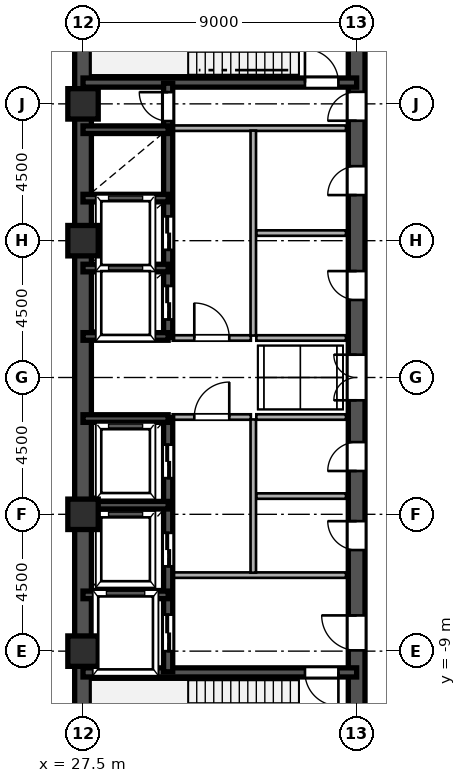
"""IFC4 building model, lengths in metres.
Left out: names, types, materials, properties, quantities, classifications, styles, units other than length and angle.
Written with IfcOpenShell. Run it as: python <this file> out.ifc"""

import sys

from ifc_helpers import new_model, si_unit, direction, frame, frame_2d, origin, origin_2d, place, context, subcontext, project, spatial, rectangle, hollow_rectangle, extrude, source, transform, mapped, element, fill, save


model = new_model("IFC4")
c1 = context("Model", 3, precision=1e-05, world=origin(), true_north=direction((0.0, 1.0)))
c2 = subcontext(c1, "Body", "Model", "MODEL_VIEW")
j1 = project(units=[si_unit("LENGTHUNIT", "METRE"), si_unit("PLANEANGLEUNIT", "RADIAN")], contexts=[c1])
p1 = place(None, origin())
s1 = spatial("IfcSite", under=j1, at=p1, CompositionType="ELEMENT")
p2 = place(p1, origin())
s2 = spatial("IfcBuilding", under=s1, at=p2, CompositionType="ELEMENT")
p3 = place(p2, frame((0.0, 0.0, 135.6)))
s3 = spatial("IfcBuildingStorey", under=s2, at=p3, CompositionType="ELEMENT", Elevation=135.6)
m1 = source(origin(), c2, "Body", "SweptSolid", [
    extrude(hollow_rectangle(XDim=1.0, YDim=1.0, WallThickness=0.042, at=origin_2d()), origin(), (0.0, 0.0, 1.0), 4.8),
])
for number, where, z_axis, x_axis in (
    (1, (27.5, -9.0, 0.0), (0.0, 0.0, 1.0), (1.0, 0.0, 0.0)),
    (2, (27.5, -4.5, 0.0), (0.0, 0.0, 1.0), (1.0, 0.0, 0.0)),
    (3, (27.5, 4.5, 0.0), (0.0, 0.0, 1.0), (1.0, 0.0, 0.0)),
    (4, (27.5, 9.0, 0.0), (0.0, 0.0, 1.0), (1.0, 0.0, 0.0)),
):
    element("IfcColumn", number, at=place(p3, frame(where, z_axis=z_axis, x_axis=x_axis)), inside=s3, PredefinedType="COLUMN", context=c2, shape_type="MappedRepresentation", body=[
        mapped(m1, transform((0.0, 0.0, 0.0), scale=1.0)),
    ])
for number, where, z_axis, x_axis in (
    (5, (27.5, -13.5, 0.0), (0.0, 0.0, 1.0), (0.0, 1.0, 0.0)),
    (6, (27.5, 1.3, 0.0), (0.0, 0.0, 1.0), (0.0, 1.0, 0.0)),
):
    element("IfcWall", number, at=place(p3, frame(where, z_axis=z_axis, x_axis=x_axis)), inside=s3, PredefinedType="SHEAR", context=c2, shape_type="SweptSolid", body=[
        extrude(rectangle(XDim=12.2, YDim=0.55, at=frame_2d((6.1, 0.0))), origin(), (0.0, 0.0, 1.0), 4.58),
    ])
p4 = place(p3, frame((27.5, -1.3, 0.0), z_axis=(0.0, 0.0, 1.0), x_axis=(0.0, 1.0, 0.0)))
e7 = element("IfcWall", 7, at=p4, inside=s3, PredefinedType="SHEAR", context=c2, shape_type="SweptSolid", body=[
    extrude(rectangle(XDim=2.6, YDim=0.55, at=frame_2d((1.3, 0.0))), origin(), (0.0, 0.0, 1.0), 4.58),
])
p5 = place(p3, frame((36.5, -13.65, 0.0), z_axis=(0.0, 0.0, 1.0), x_axis=(0.0, 1.0, 0.0)))
e8 = element("IfcWall", 8, at=p5, inside=s3, PredefinedType="SHEAR", context=c2, shape_type="SweptSolid", body=[
    extrude(rectangle(XDim=7.15, YDim=0.55, at=frame_2d((3.575, 0.0))), origin(), (0.0, 0.0, 1.0), 4.58),
])
p6 = place(p5, frame((4.675, 0.0, 0.0)))
e9 = element("IfcOpeningElement", 9, at=p6, cuts=e8, PredefinedType="OPENING", context=c2, shape_type="SweptSolid", body=[
    extrude(rectangle(XDim=1.15, YDim=2.2, at=frame_2d((0.575, 1.1))), frame((0.0, 0.285, 0.0), z_axis=(0.0, -1.0, 0.0), x_axis=(1.0, 0.0, 0.0)), (0.0, 0.0, 1.0), 0.57),
])
p7 = place(p3, frame((36.5, -1.3, 0.0), z_axis=(0.0, 0.0, 1.0), x_axis=(0.0, 1.0, 0.0)))
e10 = element("IfcWall", 10, at=p7, inside=s3, PredefinedType="SHEAR", context=c2, shape_type="SweptSolid", body=[
    extrude(rectangle(XDim=2.6, YDim=0.55, at=frame_2d((1.3, 0.0))), origin(), (0.0, 0.0, 1.0), 4.58),
])
p8 = place(p7, frame((0.55, 0.0, 0.0)))
e11 = element("IfcOpeningElement", 11, at=p8, cuts=e10, PredefinedType="OPENING", context=c2, shape_type="SweptSolid", body=[
    extrude(rectangle(XDim=1.5, YDim=2.3, at=frame_2d((0.75, 1.15))), frame((0.0, 0.285, 0.0), z_axis=(0.0, -1.0, 0.0), x_axis=(1.0, 0.0, 0.0)), (0.0, 0.0, 1.0), 0.57),
])
p9 = place(p3, frame((36.5, 8.2, 0.0), z_axis=(0.0, 0.0, 1.0), x_axis=(0.0, 1.0, 0.0)))
e12 = element("IfcWall", 12, at=p9, inside=s3, PredefinedType="SHEAR", context=c2, shape_type="SweptSolid", body=[
    extrude(rectangle(XDim=5.45, YDim=0.55, at=frame_2d((2.725, 0.0))), origin(), (0.0, 0.0, 1.0), 4.58),
])
p10 = place(p9, frame((0.245, 0.0, 0.0)))
e13 = element("IfcOpeningElement", 13, at=p10, cuts=e12, PredefinedType="OPENING", context=c2, shape_type="SweptSolid", body=[
    extrude(rectangle(XDim=0.95, YDim=2.15, at=frame_2d((0.475, 1.075))), frame((0.0, 0.285, 0.0), z_axis=(0.0, -1.0, 0.0), x_axis=(1.0, 0.0, 0.0)), (0.0, 0.0, 1.0), 0.57),
])
p11 = place(p3, frame((36.5, -6.5, 0.0), z_axis=(0.0, 0.0, 1.0), x_axis=(0.0, 1.0, 0.0)))
e14 = element("IfcWall", 14, at=p11, inside=s3, PredefinedType="SHEAR", context=c2, shape_type="SweptSolid", body=[
    extrude(rectangle(XDim=2.6, YDim=0.55, at=frame_2d((1.3, 0.0))), origin(), (0.0, 0.0, 1.0), 4.58),
])
p12 = place(p11, frame((0.825, 0.0, 0.0)))
e15 = element("IfcOpeningElement", 15, at=p12, cuts=e14, PredefinedType="OPENING", context=c2, shape_type="SweptSolid", body=[
    extrude(rectangle(XDim=0.95, YDim=2.15, at=frame_2d((0.475, 1.075))), frame((0.0, 0.285, 0.0), z_axis=(0.0, -1.0, 0.0), x_axis=(1.0, 0.0, 0.0)), (0.0, 0.0, 1.0), 0.57),
])
p13 = place(p3, frame((36.5, -3.9, 0.0), z_axis=(0.0, 0.0, 1.0), x_axis=(0.0, 1.0, 0.0)))
e16 = element("IfcWall", 16, at=p13, inside=s3, PredefinedType="SHEAR", context=c2, shape_type="SweptSolid", body=[
    extrude(rectangle(XDim=2.6, YDim=0.55, at=frame_2d((1.3, 0.0))), origin(), (0.0, 0.0, 1.0), 4.58),
])
p14 = place(p13, frame((0.825, 0.0, 0.0)))
e17 = element("IfcOpeningElement", 17, at=p14, cuts=e16, PredefinedType="OPENING", context=c2, shape_type="SweptSolid", body=[
    extrude(rectangle(XDim=0.95, YDim=2.15, at=frame_2d((0.475, 1.075))), frame((0.0, 0.285, 0.0), z_axis=(0.0, -1.0, 0.0), x_axis=(1.0, 0.0, 0.0)), (0.0, 0.0, 1.0), 0.57),
])
p15 = place(p3, frame((36.5, 1.3, 0.0), z_axis=(0.0, 0.0, 1.0), x_axis=(0.0, 1.0, 0.0)))
e18 = element("IfcWall", 18, at=p15, inside=s3, PredefinedType="SHEAR", context=c2, shape_type="SweptSolid", body=[
    extrude(rectangle(XDim=3.45, YDim=0.55, at=frame_2d((1.725, 0.0))), origin(), (0.0, 0.0, 1.0), 4.58),
])
p16 = place(p15, frame((1.25, 0.0, 0.0)))
e19 = element("IfcOpeningElement", 19, at=p16, cuts=e18, PredefinedType="OPENING", context=c2, shape_type="SweptSolid", body=[
    extrude(rectangle(XDim=0.95, YDim=2.15, at=frame_2d((0.475, 1.075))), frame((0.0, 0.285, 0.0), z_axis=(0.0, -1.0, 0.0), x_axis=(1.0, 0.0, 0.0)), (0.0, 0.0, 1.0), 0.57),
])
p17 = place(p3, frame((36.5, 4.75, 0.0), z_axis=(0.0, 0.0, 1.0), x_axis=(0.0, 1.0, 0.0)))
e20 = element("IfcWall", 20, at=p17, inside=s3, PredefinedType="SHEAR", context=c2, shape_type="SweptSolid", body=[
    extrude(rectangle(XDim=3.45, YDim=0.55, at=frame_2d((1.725, 0.0))), origin(), (0.0, 0.0, 1.0), 4.58),
])
p18 = place(p17, frame((1.25, 0.0, 0.0)))
e21 = element("IfcOpeningElement", 21, at=p18, cuts=e20, PredefinedType="OPENING", context=c2, shape_type="SweptSolid", body=[
    extrude(rectangle(XDim=0.95, YDim=2.15, at=frame_2d((0.475, 1.075))), frame((0.0, 0.285, 0.0), z_axis=(0.0, -1.0, 0.0), x_axis=(1.0, 0.0, 0.0)), (0.0, 0.0, 1.0), 0.57),
])
p19 = place(p3, frame((27.5, -9.7, 0.0), z_axis=(0.0, 0.0, 1.0), x_axis=(1.0, 0.0, 0.0)))
e22 = element("IfcWall", 22, at=p19, inside=s3, PredefinedType="SHEAR", context=c2, shape_type="SweptSolid", body=[
    extrude(rectangle(XDim=9.0, YDim=0.3, at=frame_2d((4.5, 0.0))), origin(), (0.0, 0.0, 1.0), 4.58),
])
p20 = place(p19, frame((7.3, 0.0, 0.0)))
e23 = element("IfcOpeningElement", 23, at=p20, cuts=e22, PredefinedType="OPENING", context=c2, shape_type="SweptSolid", body=[
    extrude(rectangle(XDim=1.1, YDim=2.2, at=frame_2d((0.55, 1.1))), frame((0.0, 0.16, 0.0), z_axis=(0.0, -1.0, 0.0), x_axis=(1.0, 0.0, 0.0)), (0.0, 0.0, 1.0), 0.32),
])
p21 = place(p3, frame((27.5, 9.7, 0.0), z_axis=(0.0, 0.0, 1.0), x_axis=(1.0, 0.0, 0.0)))
e24 = element("IfcWall", 24, at=p21, inside=s3, PredefinedType="SHEAR", context=c2, shape_type="SweptSolid", body=[
    extrude(rectangle(XDim=9.0, YDim=0.3, at=frame_2d((4.5, 0.0))), origin(), (0.0, 0.0, 1.0), 4.58),
])
p22 = place(p21, frame((7.3, 0.0, 0.0)))
e25 = element("IfcOpeningElement", 25, at=p22, cuts=e24, PredefinedType="OPENING", context=c2, shape_type="SweptSolid", body=[
    extrude(rectangle(XDim=1.1, YDim=2.2, at=frame_2d((0.55, 1.1))), frame((0.0, 0.16, 0.0), z_axis=(0.0, -1.0, 0.0), x_axis=(1.0, 0.0, 0.0)), (0.0, 0.0, 1.0), 0.32),
])
for number, where, z_axis, x_axis in (
    (26, (27.5, -7.15, 0.0), (0.0, 0.0, 1.0), (1.0, 0.0, 0.0)),
    (27, (27.5, -4.2, 0.0), (0.0, 0.0, 1.0), (1.0, 0.0, 0.0)),
    (28, (27.5, -1.35, 0.0), (0.0, 0.0, 1.0), (1.0, 0.0, 0.0)),
    (29, (27.5, 1.35, 0.0), (0.0, 0.0, 1.0), (1.0, 0.0, 0.0)),
    (30, (27.5, 3.6, 0.0), (0.0, 0.0, 1.0), (1.0, 0.0, 0.0)),
    (31, (27.5, 5.9, 0.0), (0.0, 0.0, 1.0), (1.0, 0.0, 0.0)),
    (32, (27.5, 8.15, 0.0), (0.0, 0.0, 1.0), (1.0, 0.0, 0.0)),
):
    element("IfcWall", number, at=place(p3, frame(where, z_axis=z_axis, x_axis=x_axis)), inside=s3, PredefinedType="SHEAR", context=c2, shape_type="SweptSolid", body=[
        extrude(rectangle(XDim=2.8, YDim=0.25, at=frame_2d((1.4, 0.0))), origin(), (0.0, 0.0, 1.0), 4.58),
    ])
p23 = place(p3, frame((30.3, -9.68, 0.0), z_axis=(0.0, 0.0, 1.0), x_axis=(0.0, 1.0, 0.0)))
e33 = element("IfcWall", 33, at=p23, inside=s3, PredefinedType="SHEAR", context=c2, shape_type="SweptSolid", body=[
    extrude(rectangle(XDim=2.56, YDim=0.3, at=frame_2d((1.28, 0.0))), origin(), (0.0, 0.0, 1.0), 4.58),
])
p24 = place(p23, frame((0.68, 0.0, 0.0)))
e34 = element("IfcOpeningElement", 34, at=p24, cuts=e33, PredefinedType="OPENING", context=c2, shape_type="SweptSolid", body=[
    extrude(rectangle(XDim=1.2, YDim=2.25, at=frame_2d((0.6, 1.125))), frame((0.0, 0.16, 0.0), z_axis=(0.0, -1.0, 0.0), x_axis=(1.0, 0.0, 0.0)), (0.0, 0.0, 1.0), 0.32),
])
p25 = place(p3, frame((30.3, -7.12, 0.0), z_axis=(0.0, 0.0, 1.0), x_axis=(0.0, 1.0, 0.0)))
e35 = element("IfcWall", 35, at=p25, inside=s3, PredefinedType="SHEAR", context=c2, shape_type="SweptSolid", body=[
    extrude(rectangle(XDim=2.92, YDim=0.3, at=frame_2d((1.46, 0.0))), origin(), (0.0, 0.0, 1.0), 4.58),
])
p26 = place(p25, frame((0.91, 0.0, 0.0)))
e36 = element("IfcOpeningElement", 36, at=p26, cuts=e35, PredefinedType="OPENING", context=c2, shape_type="SweptSolid", body=[
    extrude(rectangle(XDim=1.1, YDim=2.2, at=frame_2d((0.55, 1.1))), frame((0.0, 0.16, 0.0), z_axis=(0.0, -1.0, 0.0), x_axis=(1.0, 0.0, 0.0)), (0.0, 0.0, 1.0), 0.32),
])
p27 = place(p3, frame((30.3, -4.2, 0.0), z_axis=(0.0, 0.0, 1.0), x_axis=(0.0, 1.0, 0.0)))
e37 = element("IfcWall", 37, at=p27, inside=s3, PredefinedType="SHEAR", context=c2, shape_type="SweptSolid", body=[
    extrude(rectangle(XDim=2.88, YDim=0.3, at=frame_2d((1.44, 0.0))), origin(), (0.0, 0.0, 1.0), 4.58),
])
p28 = place(p27, frame((0.89, 0.0, 0.0)))
e38 = element("IfcOpeningElement", 38, at=p28, cuts=e37, PredefinedType="OPENING", context=c2, shape_type="SweptSolid", body=[
    extrude(rectangle(XDim=1.1, YDim=2.2, at=frame_2d((0.55, 1.1))), frame((0.0, 0.16, 0.0), z_axis=(0.0, -1.0, 0.0), x_axis=(1.0, 0.0, 0.0)), (0.0, 0.0, 1.0), 0.32),
])
p29 = place(p3, frame((30.3, 1.32, 0.0), z_axis=(0.0, 0.0, 1.0), x_axis=(0.0, 1.0, 0.0)))
e39 = element("IfcWall", 39, at=p29, inside=s3, PredefinedType="SHEAR", context=c2, shape_type="SweptSolid", body=[
    extrude(rectangle(XDim=2.28, YDim=0.3, at=frame_2d((1.14, 0.0))), origin(), (0.0, 0.0, 1.0), 4.58),
])
p30 = place(p29, frame((0.59, 0.0, 0.0)))
e40 = element("IfcOpeningElement", 40, at=p30, cuts=e39, PredefinedType="OPENING", context=c2, shape_type="SweptSolid", body=[
    extrude(rectangle(XDim=1.1, YDim=2.2, at=frame_2d((0.55, 1.1))), frame((0.0, 0.16, 0.0), z_axis=(0.0, -1.0, 0.0), x_axis=(1.0, 0.0, 0.0)), (0.0, 0.0, 1.0), 0.32),
])
p31 = place(p3, frame((30.3, 3.6, 0.0), z_axis=(0.0, 0.0, 1.0), x_axis=(0.0, 1.0, 0.0)))
e41 = element("IfcWall", 41, at=p31, inside=s3, PredefinedType="SHEAR", context=c2, shape_type="SweptSolid", body=[
    extrude(rectangle(XDim=2.3, YDim=0.3, at=frame_2d((1.15, 0.0))), origin(), (0.0, 0.0, 1.0), 4.58),
])
p32 = place(p31, frame((0.6, 0.0, 0.0)))
e42 = element("IfcOpeningElement", 42, at=p32, cuts=e41, PredefinedType="OPENING", context=c2, shape_type="SweptSolid", body=[
    extrude(rectangle(XDim=1.1, YDim=2.2, at=frame_2d((0.55, 1.1))), frame((0.0, 0.16, 0.0), z_axis=(0.0, -1.0, 0.0), x_axis=(1.0, 0.0, 0.0)), (0.0, 0.0, 1.0), 0.32),
])
p33 = place(p3, frame((30.3, 5.9, 0.0), z_axis=(0.0, 0.0, 1.0), x_axis=(0.0, 1.0, 0.0)))
e43 = element("IfcWall", 43, at=p33, inside=s3, PredefinedType="SHEAR", context=c2, shape_type="SweptSolid", body=[
    extrude(rectangle(XDim=2.25, YDim=0.3, at=frame_2d((1.125, 0.0))), origin(), (0.0, 0.0, 1.0), 4.58),
])
p34 = place(p3, frame((30.3, 8.15, 0.0), z_axis=(0.0, 0.0, 1.0), x_axis=(0.0, 1.0, 0.0)))
e44 = element("IfcWall", 44, at=p34, inside=s3, PredefinedType="SHEAR", context=c2, shape_type="SweptSolid", body=[
    extrude(rectangle(XDim=1.53, YDim=0.3, at=frame_2d((0.765, 0.0))), origin(), (0.0, 0.0, 1.0), 4.58),
])
p35 = place(p34, frame((0.285, 0.0, 0.0)))
e45 = element("IfcOpeningElement", 45, at=p35, cuts=e44, PredefinedType="OPENING", context=c2, shape_type="SweptSolid", body=[
    extrude(rectangle(XDim=0.95, YDim=2.15, at=frame_2d((0.475, 1.075))), frame((0.0, 0.16, 0.0), z_axis=(0.0, -1.0, 0.0), x_axis=(1.0, 0.0, 0.0)), (0.0, 0.0, 1.0), 0.32),
])
for number, where, z_axis, x_axis in (
    (46, (30.45, -6.5, 0.0), (0.0, 0.0, 1.0), (1.0, 0.0, 0.0)),
    (47, (30.45, 8.2, 0.0), (0.0, 0.0, 1.0), (1.0, 0.0, 0.0)),
):
    element("IfcWall", number, at=place(p3, frame(where, z_axis=z_axis, x_axis=x_axis)), inside=s3, PredefinedType="PARTITIONING", context=c2, shape_type="SweptSolid", body=[
        extrude(rectangle(XDim=5.7, YDim=0.18, at=frame_2d((2.85, 0.0))), origin(), (0.0, 0.0, 1.0), 4.58),
    ])
p36 = place(p3, frame((33.1, -6.42, 0.0), z_axis=(0.0, 0.0, 1.0), x_axis=(0.0, 1.0, 0.0)))
e48 = element("IfcWall", 48, at=p36, inside=s3, PredefinedType="PARTITIONING", context=c2, shape_type="SweptSolid", body=[
    extrude(rectangle(XDim=5.04, YDim=0.18, at=frame_2d((2.52, 0.0))), origin(), (0.0, 0.0, 1.0), 4.58),
])
p37 = place(p3, frame((33.1, 1.38, 0.0), z_axis=(0.0, 0.0, 1.0), x_axis=(0.0, 1.0, 0.0)))
e49 = element("IfcWall", 49, at=p37, inside=s3, PredefinedType="PARTITIONING", context=c2, shape_type="SweptSolid", body=[
    extrude(rectangle(XDim=6.74, YDim=0.18, at=frame_2d((3.37, 0.0))), origin(), (0.0, 0.0, 1.0), 4.58),
])
p38 = place(p3, frame((30.45, -1.3, 0.0), z_axis=(0.0, 0.0, 1.0), x_axis=(1.0, 0.0, 0.0)))
e50 = element("IfcWall", 50, at=p38, inside=s3, PredefinedType="PARTITIONING", context=c2, shape_type="SweptSolid", body=[
    extrude(rectangle(XDim=2.57, YDim=0.18, at=frame_2d((1.285, 0.0))), origin(), (0.0, 0.0, 1.0), 4.58),
])
p39 = place(p38, frame((0.71, 0.0, 0.0)))
e51 = element("IfcOpeningElement", 51, at=p39, cuts=e50, PredefinedType="OPENING", context=c2, shape_type="SweptSolid", body=[
    extrude(rectangle(XDim=1.15, YDim=2.2, at=frame_2d((0.575, 1.1))), frame((0.0, 0.1, 0.0), z_axis=(0.0, -1.0, 0.0), x_axis=(1.0, 0.0, 0.0)), (0.0, 0.0, 1.0), 0.2),
])
p40 = place(p3, frame((30.45, 1.3, 0.0), z_axis=(0.0, 0.0, 1.0), x_axis=(1.0, 0.0, 0.0)))
e52 = element("IfcWall", 52, at=p40, inside=s3, PredefinedType="PARTITIONING", context=c2, shape_type="SweptSolid", body=[
    extrude(rectangle(XDim=2.57, YDim=0.18, at=frame_2d((1.285, 0.0))), origin(), (0.0, 0.0, 1.0), 4.58),
])
p41 = place(p40, frame((0.71, 0.0, 0.0)))
e53 = element("IfcOpeningElement", 53, at=p41, cuts=e52, PredefinedType="OPENING", context=c2, shape_type="SweptSolid", body=[
    extrude(rectangle(XDim=1.15, YDim=2.2, at=frame_2d((0.575, 1.1))), frame((0.0, 0.1, 0.0), z_axis=(0.0, -1.0, 0.0), x_axis=(1.0, 0.0, 0.0)), (0.0, 0.0, 1.0), 0.2),
])
for number, where, z_axis, x_axis in (
    (54, (33.2, -1.3, 0.0), (0.0, 0.0, 1.0), (1.0, 0.0, 0.0)),
    (55, (33.2, 1.3, 0.0), (0.0, 0.0, 1.0), (1.0, 0.0, 0.0)),
    (56, (33.2, -3.9, 0.0), (0.0, 0.0, 1.0), (1.0, 0.0, 0.0)),
    (57, (33.2, 4.75, 0.0), (0.0, 0.0, 1.0), (1.0, 0.0, 0.0)),
):
    element("IfcWall", number, at=place(p3, frame(where, z_axis=z_axis, x_axis=x_axis)), inside=s3, PredefinedType="PARTITIONING", context=c2, shape_type="SweptSolid", body=[
        extrude(rectangle(XDim=2.95, YDim=0.18, at=frame_2d((1.475, 0.0))), origin(), (0.0, 0.0, 1.0), 4.58),
    ])
m2 = source(origin(), c2, "Body", "SweptSolid", [
    extrude(rectangle(XDim=1.15, YDim=2.2, at=frame_2d((0.575, 1.1))), frame((0.0, 0.025, 0.0), z_axis=(0.0, -1.0, 0.0), x_axis=(1.0, 0.0, 0.0)), (0.0, 0.0, 1.0), 0.05),
])
p42 = place(p6, origin())
e58 = element("IfcDoor", 58, at=p42, inside=s3, OperationType="SINGLE_SWING_RIGHT", PredefinedType="DOOR", context=c2, shape_type="MappedRepresentation", body=[
    mapped(m2, transform((0.0, 0.0, 0.0), scale=1.0)),
])
fill(e9, e58)
m3 = source(origin(), c2, "Body", "SweptSolid", [
    extrude(rectangle(XDim=1.5, YDim=2.3, at=frame_2d((0.75, 1.15))), frame((0.0, 0.025, 0.0), z_axis=(0.0, -1.0, 0.0), x_axis=(1.0, 0.0, 0.0)), (0.0, 0.0, 1.0), 0.05),
])
p43 = place(p8, origin())
e59 = element("IfcDoor", 59, at=p43, inside=s3, OperationType="DOUBLE_SWING_LEFT", PredefinedType="DOOR", context=c2, shape_type="MappedRepresentation", body=[
    mapped(m3, transform((0.0, 0.0, 0.0), scale=1.0)),
])
fill(e11, e59)
m4 = source(origin(), c2, "Body", "SweptSolid", [
    extrude(rectangle(XDim=0.95, YDim=2.15, at=frame_2d((0.475, 1.075))), frame((0.0, 0.025, 0.0), z_axis=(0.0, -1.0, 0.0), x_axis=(1.0, 0.0, 0.0)), (0.0, 0.0, 1.0), 0.05),
])
p44 = place(p10, origin())
e60 = element("IfcDoor", 60, at=p44, inside=s3, OperationType="SINGLE_SWING_LEFT", PredefinedType="DOOR", context=c2, shape_type="MappedRepresentation", body=[
    mapped(m4, transform((0.0, 0.0, 0.0), scale=1.0)),
])
fill(e13, e60)
p45 = place(p12, origin())
e61 = element("IfcDoor", 61, at=p45, inside=s3, OperationType="SINGLE_SWING_RIGHT", PredefinedType="DOOR", context=c2, shape_type="MappedRepresentation", body=[
    mapped(m4, transform((0.0, 0.0, 0.0), scale=1.0)),
])
fill(e15, e61)
p46 = place(p14, origin())
e62 = element("IfcDoor", 62, at=p46, inside=s3, OperationType="SINGLE_SWING_LEFT", PredefinedType="DOOR", context=c2, shape_type="MappedRepresentation", body=[
    mapped(m4, transform((0.0, 0.0, 0.0), scale=1.0)),
])
fill(e17, e62)
p47 = place(p16, origin())
e63 = element("IfcDoor", 63, at=p47, inside=s3, OperationType="SINGLE_SWING_RIGHT", PredefinedType="DOOR", context=c2, shape_type="MappedRepresentation", body=[
    mapped(m4, transform((0.0, 0.0, 0.0), scale=1.0)),
])
fill(e19, e63)
p48 = place(p18, origin())
e64 = element("IfcDoor", 64, at=p48, inside=s3, OperationType="SINGLE_SWING_LEFT", PredefinedType="DOOR", context=c2, shape_type="MappedRepresentation", body=[
    mapped(m4, transform((0.0, 0.0, 0.0), scale=1.0)),
])
fill(e21, e64)
m5 = source(origin(), c2, "Body", "SweptSolid", [
    extrude(rectangle(XDim=1.1, YDim=2.2, at=frame_2d((0.55, 1.1))), frame((0.0, 0.025, 0.0), z_axis=(0.0, -1.0, 0.0), x_axis=(1.0, 0.0, 0.0)), (0.0, 0.0, 1.0), 0.05),
])
p49 = place(p20, frame((1.1, 0.0, 0.0), z_axis=(0.0, 0.0, 1.0), x_axis=(-1.0, 0.0, 0.0)))
e65 = element("IfcDoor", 65, at=p49, inside=s3, OperationType="SINGLE_SWING_RIGHT", PredefinedType="DOOR", context=c2, shape_type="MappedRepresentation", body=[
    mapped(m5, transform((0.0, 0.0, 0.0), scale=1.0)),
])
fill(e23, e65)
p50 = place(p22, origin())
e66 = element("IfcDoor", 66, at=p50, inside=s3, OperationType="SINGLE_SWING_LEFT", PredefinedType="DOOR", context=c2, shape_type="MappedRepresentation", body=[
    mapped(m5, transform((0.0, 0.0, 0.0), scale=1.0)),
])
fill(e25, e66)
m6 = source(origin(), c2, "Body", "SweptSolid", [
    extrude(rectangle(XDim=1.2, YDim=2.25, at=frame_2d((0.6, 1.125))), frame((0.0, 0.025, 0.0), z_axis=(0.0, -1.0, 0.0), x_axis=(1.0, 0.0, 0.0)), (0.0, 0.0, 1.0), 0.05),
])
p51 = place(p24, origin())
e67 = element("IfcDoor", 67, at=p51, inside=s3, OperationType="DOUBLE_DOOR_SLIDING", PredefinedType="DOOR", context=c2, shape_type="MappedRepresentation", body=[
    mapped(m6, transform((0.0, 0.0, 0.0), scale=1.0)),
])
fill(e34, e67)
m7 = source(origin(), c2, "Body", "SweptSolid", [
    extrude(rectangle(XDim=1.1, YDim=2.2, at=frame_2d((0.55, 1.1))), frame((0.0, 0.025, 0.0), z_axis=(0.0, -1.0, 0.0), x_axis=(1.0, 0.0, 0.0)), (0.0, 0.0, 1.0), 0.05),
])
p52 = place(p26, origin())
e68 = element("IfcDoor", 68, at=p52, inside=s3, OperationType="DOUBLE_DOOR_SLIDING", PredefinedType="DOOR", context=c2, shape_type="MappedRepresentation", body=[
    mapped(m7, transform((0.0, 0.0, 0.0), scale=1.0)),
])
fill(e36, e68)
p53 = place(p28, origin())
e69 = element("IfcDoor", 69, at=p53, inside=s3, OperationType="DOUBLE_DOOR_SLIDING", PredefinedType="DOOR", context=c2, shape_type="MappedRepresentation", body=[
    mapped(m7, transform((0.0, 0.0, 0.0), scale=1.0)),
])
fill(e38, e69)
p54 = place(p30, origin())
e70 = element("IfcDoor", 70, at=p54, inside=s3, OperationType="DOUBLE_DOOR_SLIDING", PredefinedType="DOOR", context=c2, shape_type="MappedRepresentation", body=[
    mapped(m7, transform((0.0, 0.0, 0.0), scale=1.0)),
])
fill(e40, e70)
p55 = place(p32, origin())
e71 = element("IfcDoor", 71, at=p55, inside=s3, OperationType="DOUBLE_DOOR_SLIDING", PredefinedType="DOOR", context=c2, shape_type="MappedRepresentation", body=[
    mapped(m7, transform((0.0, 0.0, 0.0), scale=1.0)),
])
fill(e42, e71)
p56 = place(p35, origin())
e72 = element("IfcDoor", 72, at=p56, inside=s3, OperationType="SINGLE_SWING_RIGHT", PredefinedType="DOOR", context=c2, shape_type="MappedRepresentation", body=[
    mapped(m4, transform((0.0, 0.0, 0.0), scale=1.0)),
])
fill(e45, e72)
p57 = place(p39, origin())
e73 = element("IfcDoor", 73, at=p57, inside=s3, OperationType="SINGLE_SWING_RIGHT", PredefinedType="DOOR", context=c2, shape_type="MappedRepresentation", body=[
    mapped(m2, transform((0.0, 0.0, 0.0), scale=1.0)),
])
fill(e51, e73)
p58 = place(p41, origin())
e74 = element("IfcDoor", 74, at=p58, inside=s3, OperationType="SINGLE_SWING_LEFT", PredefinedType="DOOR", context=c2, shape_type="MappedRepresentation", body=[
    mapped(m2, transform((0.0, 0.0, 0.0), scale=1.0)),
])
fill(e53, e74)
save(model, sys.argv[1])
